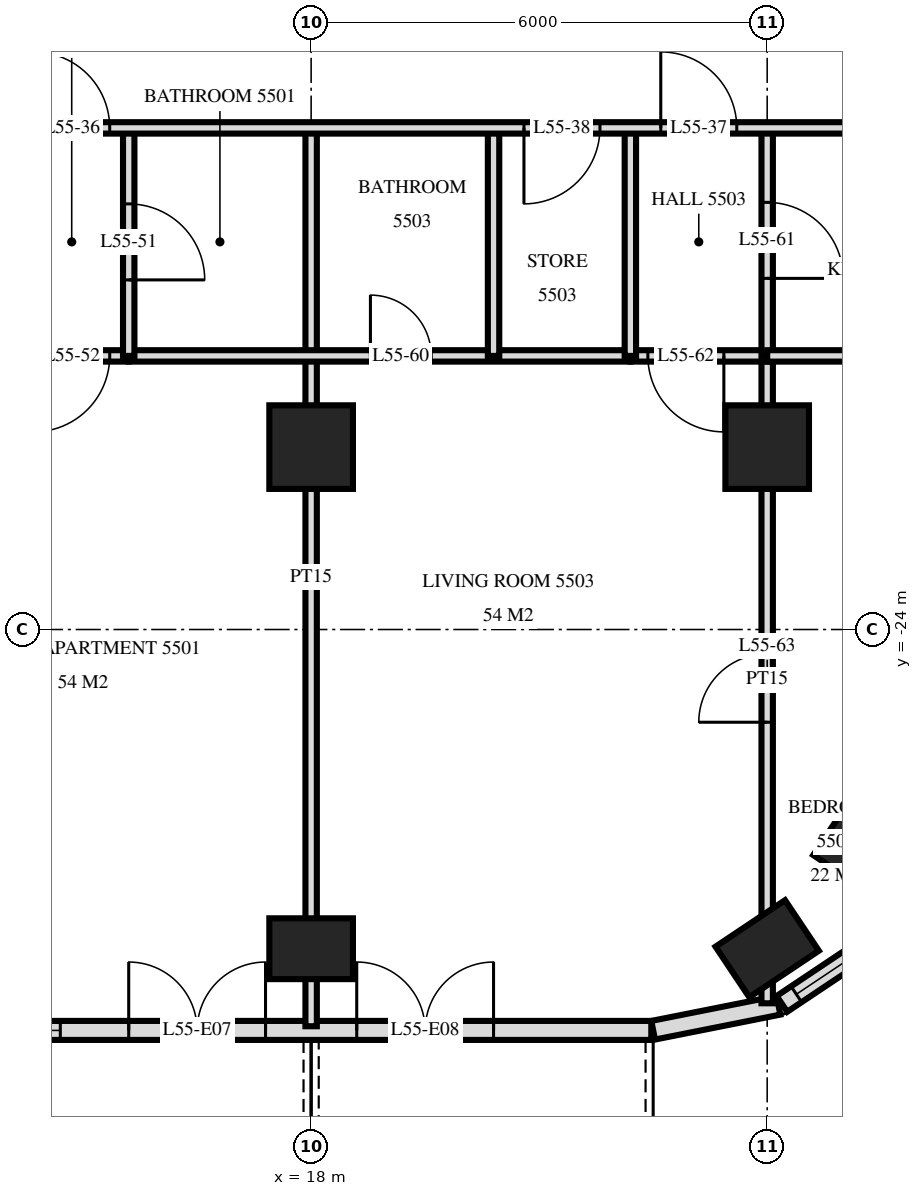
"""IFC4 building model, lengths in metres.
Left out: names, types, materials, properties, quantities, classifications, styles, units other than length and angle.
Written with IfcOpenShell. Run it as: python <this file> out.ifc"""

import sys

from ifc_helpers import new_model, si_unit, direction, frame, frame_2d, origin, origin_2d, place, context, subcontext, project, spatial, rectangle, extrude, element, fill, save


model = new_model("IFC4")
c1 = context("Model", 3, precision=1e-05, world=origin(), true_north=direction((0.0, 1.0)))
c2 = subcontext(c1, "Body", "Model", "MODEL_VIEW")
j1 = project(units=[si_unit("LENGTHUNIT", "METRE"), si_unit("PLANEANGLEUNIT", "RADIAN")], contexts=[c1])
p1 = place(None, origin())
s1 = spatial("IfcSite", under=j1, at=p1, CompositionType="ELEMENT")
p2 = place(p1, origin())
s2 = spatial("IfcBuilding", under=s1, at=p2, CompositionType="ELEMENT")
p3 = place(p2, frame((0.0, 0.0, 211.6)))
s3 = spatial("IfcBuildingStorey", under=s2, at=p3, CompositionType="ELEMENT", Elevation=211.6)
p4 = place(p3, frame((18.0, -28.2, 0.0), z_axis=(0.0, 0.0, 1.0), x_axis=(1.0, 0.0, 0.0)))
e1 = element("IfcColumn", 1, at=p4, inside=s3, PredefinedType="COLUMN", context=c2, shape_type="SweptSolid", body=[
    extrude(rectangle(XDim=1.1, YDim=0.8, at=origin_2d()), origin(), (0.0, 0.0, 1.0), 3.5),
])
p5 = place(p3, frame((18.0, -21.6, 0.0), z_axis=(0.0, 0.0, 1.0), x_axis=(1.0, 0.0, 0.0)))
e2 = element("IfcColumn", 2, at=p5, inside=s3, PredefinedType="COLUMN", context=c2, shape_type="SweptSolid", body=[
    extrude(rectangle(XDim=1.1, YDim=1.1, at=origin_2d()), origin(), (0.0, 0.0, 1.0), 3.5),
])
p6 = place(p3, frame((24.0, -28.2, 0.0), z_axis=(0.0, 0.0, 1.0), x_axis=(0.831459915646, 0.555584744817, 0.0)))
e3 = element("IfcColumn", 3, at=p6, inside=s3, PredefinedType="COLUMN", context=c2, shape_type="SweptSolid", body=[
    extrude(rectangle(XDim=1.1, YDim=0.8, at=origin_2d()), origin(), (0.0, 0.0, 1.0), 3.5),
])
p7 = place(p3, frame((24.0, -21.6, 0.0), z_axis=(0.0, 0.0, 1.0), x_axis=(1.0, 0.0, 0.0)))
e4 = element("IfcColumn", 4, at=p7, inside=s3, PredefinedType="COLUMN", context=c2, shape_type="SweptSolid", body=[
    extrude(rectangle(XDim=1.1, YDim=1.1, at=origin_2d()), origin(), (0.0, 0.0, 1.0), 3.5),
])
p8 = place(p3, frame((25.244, -26.733, 0.0), z_axis=(0.0, 0.0, 1.0), x_axis=(0.555584744817, 0.831459915646, 0.0)))
e5 = element("IfcColumn", 5, at=p8, inside=s3, PredefinedType="COLUMN", context=c2, shape_type="SweptSolid", body=[
    extrude(rectangle(XDim=1.1, YDim=0.8, at=origin_2d()), origin(), (0.0, 0.0, 1.0), 3.5),
])
p9 = place(p3, frame((-22.475, -29.275, 0.0), z_axis=(0.0, 0.0, 1.0), x_axis=(1.0, 0.0, 0.0)))
e6 = element("IfcWall", 6, at=p9, inside=s3, PredefinedType="SOLIDWALL", context=c2, shape_type="SweptSolid", body=[
    extrude(rectangle(XDim=44.951, YDim=0.25, at=frame_2d((22.475, 0.0))), origin(), (0.0, 0.0, 1.0), 3.22),
])
p10 = place(p9, frame((0.575, 0.0, 0.0)))
e7 = element("IfcOpeningElement", 7, at=p10, cuts=e6, PredefinedType="OPENING", context=c2, shape_type="SweptSolid", body=[
    extrude(rectangle(XDim=1.8, YDim=2.4, at=frame_2d((0.9, 1.2))), frame((0.0, 0.135, 0.0), z_axis=(0.0, -1.0, 0.0), x_axis=(1.0, 0.0, 0.0)), (0.0, 0.0, 1.0), 0.27),
])
p11 = place(p9, frame((6.2, 0.0, 0.0)))
e8 = element("IfcOpeningElement", 8, at=p11, cuts=e6, PredefinedType="OPENING", context=c2, shape_type="SweptSolid", body=[
    extrude(rectangle(XDim=1.8, YDim=2.4, at=frame_2d((0.9, 1.2))), frame((0.0, 0.135, 0.0), z_axis=(0.0, -1.0, 0.0), x_axis=(1.0, 0.0, 0.0)), (0.0, 0.0, 1.0), 0.27),
])
p12 = place(p9, frame((8.45, 0.0, 0.9)))
e9 = element("IfcOpeningElement", 9, at=p12, cuts=e6, PredefinedType="OPENING", context=c2, shape_type="SweptSolid", body=[
    extrude(rectangle(XDim=1.8, YDim=1.5, at=frame_2d((0.9, 0.75))), frame((0.0, 0.135, 0.0), z_axis=(0.0, -1.0, 0.0), x_axis=(1.0, 0.0, 0.0)), (0.0, 0.0, 1.0), 0.27),
])
p13 = place(p9, frame((11.075, 0.0, 0.0)))
e10 = element("IfcOpeningElement", 10, at=p13, cuts=e6, PredefinedType="OPENING", context=c2, shape_type="SweptSolid", body=[
    extrude(rectangle(XDim=1.8, YDim=2.4, at=frame_2d((0.9, 1.2))), frame((0.0, 0.135, 0.0), z_axis=(0.0, -1.0, 0.0), x_axis=(1.0, 0.0, 0.0)), (0.0, 0.0, 1.0), 0.27),
])
p14 = place(p9, frame((13.775, 0.0, 0.9)))
e11 = element("IfcOpeningElement", 11, at=p14, cuts=e6, PredefinedType="OPENING", context=c2, shape_type="SweptSolid", body=[
    extrude(rectangle(XDim=2.4, YDim=1.5, at=frame_2d((1.2, 0.75))), frame((0.0, 0.135, 0.0), z_axis=(0.0, -1.0, 0.0), x_axis=(1.0, 0.0, 0.0)), (0.0, 0.0, 1.0), 0.27),
])
p15 = place(p9, frame((16.775, 0.0, 0.9)))
e12 = element("IfcOpeningElement", 12, at=p15, cuts=e6, PredefinedType="OPENING", context=c2, shape_type="SweptSolid", body=[
    extrude(rectangle(XDim=2.4, YDim=1.5, at=frame_2d((1.2, 0.75))), frame((0.0, 0.135, 0.0), z_axis=(0.0, -1.0, 0.0), x_axis=(1.0, 0.0, 0.0)), (0.0, 0.0, 1.0), 0.27),
])
p16 = place(p9, frame((20.075, 0.0, 0.0)))
e13 = element("IfcOpeningElement", 13, at=p16, cuts=e6, PredefinedType="OPENING", context=c2, shape_type="SweptSolid", body=[
    extrude(rectangle(XDim=1.8, YDim=2.4, at=frame_2d((0.9, 1.2))), frame((0.0, 0.135, 0.0), z_axis=(0.0, -1.0, 0.0), x_axis=(1.0, 0.0, 0.0)), (0.0, 0.0, 1.0), 0.27),
])
p17 = place(p9, frame((23.075, 0.0, 0.0)))
e14 = element("IfcOpeningElement", 14, at=p17, cuts=e6, PredefinedType="OPENING", context=c2, shape_type="SweptSolid", body=[
    extrude(rectangle(XDim=1.8, YDim=2.4, at=frame_2d((0.9, 1.2))), frame((0.0, 0.135, 0.0), z_axis=(0.0, -1.0, 0.0), x_axis=(1.0, 0.0, 0.0)), (0.0, 0.0, 1.0), 0.27),
])
p18 = place(p9, frame((25.775, 0.0, 0.9)))
e15 = element("IfcOpeningElement", 15, at=p18, cuts=e6, PredefinedType="OPENING", context=c2, shape_type="SweptSolid", body=[
    extrude(rectangle(XDim=2.4, YDim=1.5, at=frame_2d((1.2, 0.75))), frame((0.0, 0.135, 0.0), z_axis=(0.0, -1.0, 0.0), x_axis=(1.0, 0.0, 0.0)), (0.0, 0.0, 1.0), 0.27),
])
p19 = place(p9, frame((29.075, 0.0, 0.0)))
e16 = element("IfcOpeningElement", 16, at=p19, cuts=e6, PredefinedType="OPENING", context=c2, shape_type="SweptSolid", body=[
    extrude(rectangle(XDim=1.8, YDim=2.4, at=frame_2d((0.9, 1.2))), frame((0.0, 0.135, 0.0), z_axis=(0.0, -1.0, 0.0), x_axis=(1.0, 0.0, 0.0)), (0.0, 0.0, 1.0), 0.27),
])
p20 = place(p9, frame((31.775, 0.0, 0.9)))
e17 = element("IfcOpeningElement", 17, at=p20, cuts=e6, PredefinedType="OPENING", context=c2, shape_type="SweptSolid", body=[
    extrude(rectangle(XDim=2.4, YDim=1.5, at=frame_2d((1.2, 0.75))), frame((0.0, 0.135, 0.0), z_axis=(0.0, -1.0, 0.0), x_axis=(1.0, 0.0, 0.0)), (0.0, 0.0, 1.0), 0.27),
])
p21 = place(p9, frame((34.775, 0.0, 0.9)))
e18 = element("IfcOpeningElement", 18, at=p21, cuts=e6, PredefinedType="OPENING", context=c2, shape_type="SweptSolid", body=[
    extrude(rectangle(XDim=2.4, YDim=1.5, at=frame_2d((1.2, 0.75))), frame((0.0, 0.135, 0.0), z_axis=(0.0, -1.0, 0.0), x_axis=(1.0, 0.0, 0.0)), (0.0, 0.0, 1.0), 0.27),
])
p22 = place(p9, frame((38.075, 0.0, 0.0)))
e19 = element("IfcOpeningElement", 19, at=p22, cuts=e6, PredefinedType="OPENING", context=c2, shape_type="SweptSolid", body=[
    extrude(rectangle(XDim=1.8, YDim=2.4, at=frame_2d((0.9, 1.2))), frame((0.0, 0.135, 0.0), z_axis=(0.0, -1.0, 0.0), x_axis=(1.0, 0.0, 0.0)), (0.0, 0.0, 1.0), 0.27),
])
p23 = place(p9, frame((41.075, 0.0, 0.0)))
e20 = element("IfcOpeningElement", 20, at=p23, cuts=e6, PredefinedType="OPENING", context=c2, shape_type="SweptSolid", body=[
    extrude(rectangle(XDim=1.8, YDim=2.4, at=frame_2d((0.9, 1.2))), frame((0.0, 0.135, 0.0), z_axis=(0.0, -1.0, 0.0), x_axis=(1.0, 0.0, 0.0)), (0.0, 0.0, 1.0), 0.27),
])
p24 = place(p3, frame((22.5, -29.273, 0.0), z_axis=(0.0, 0.0, 1.0), x_axis=(0.980775640221, 0.19513878023, 0.0)))
e21 = element("IfcWall", 21, at=p24, inside=s3, PredefinedType="SOLIDWALL", context=c2, shape_type="SweptSolid", body=[
    extrude(rectangle(XDim=1.681, YDim=0.25, at=frame_2d((0.841, 0.0))), origin(), (0.0, 0.0, 1.0), 3.22),
])
p25 = place(p3, frame((24.194, -28.926, 0.0), z_axis=(0.0, 0.0, 1.0), x_axis=(0.831482937015, 0.55555029066, 0.0)))
e22 = element("IfcWall", 22, at=p25, inside=s3, PredefinedType="SOLIDWALL", context=c2, shape_type="SweptSolid", body=[
    extrude(rectangle(XDim=1.656, YDim=0.25, at=frame_2d((0.828, 0.0))), origin(), (0.0, 0.0, 1.0), 3.22),
])
p26 = place(p25, frame((0.228, 0.0, 0.9)))
e23 = element("IfcOpeningElement", 23, at=p26, cuts=e22, PredefinedType="OPENING", context=c2, shape_type="SweptSolid", body=[
    extrude(rectangle(XDim=1.2, YDim=1.5, at=frame_2d((0.6, 0.75))), frame((0.0, 0.135, 0.0), z_axis=(0.0, -1.0, 0.0), x_axis=(1.0, 0.0, 0.0)), (0.0, 0.0, 1.0), 0.27),
])
p27 = place(p3, frame((24.0, -20.4, 0.0), z_axis=(0.0, 0.0, 1.0), x_axis=(0.0, 1.0, 0.0)))
e24 = element("IfcWall", 24, at=p27, inside=s3, PredefinedType="PARTITIONING", context=c2, shape_type="SweptSolid", body=[
    extrude(rectangle(XDim=3.0, YDim=0.15, at=frame_2d((1.5, 0.0))), origin(), (0.0, 0.0, 1.0), 3.22),
])
p28 = place(p27, frame((1.02, 0.0, 0.0)))
e25 = element("IfcOpeningElement", 25, at=p28, cuts=e24, PredefinedType="OPENING", context=c2, shape_type="SweptSolid", body=[
    extrude(rectangle(XDim=1.0, YDim=2.1, at=frame_2d((0.5, 1.05))), frame((0.0, 0.085, 0.0), z_axis=(0.0, -1.0, 0.0), x_axis=(1.0, 0.0, 0.0)), (0.0, 0.0, 1.0), 0.17),
])
p29 = place(p3, frame((24.0, -28.918, 0.0), z_axis=(0.0, 0.0, 1.0), x_axis=(0.0, 1.0, 0.0)))
e26 = element("IfcWall", 26, at=p29, inside=s3, PredefinedType="PARTITIONING", context=c2, shape_type="SweptSolid", body=[
    extrude(rectangle(XDim=8.518, YDim=0.15, at=frame_2d((4.259, 0.0))), origin(), (0.0, 0.0, 1.0), 3.22),
])
p30 = place(p29, frame((3.698, 0.0, 0.0)))
e27 = element("IfcOpeningElement", 27, at=p30, cuts=e26, PredefinedType="OPENING", context=c2, shape_type="SweptSolid", body=[
    extrude(rectangle(XDim=0.9, YDim=2.1, at=frame_2d((0.45, 1.05))), frame((0.0, 0.085, 0.0), z_axis=(0.0, -1.0, 0.0), x_axis=(1.0, 0.0, 0.0)), (0.0, 0.0, 1.0), 0.17),
])
for number, where, z_axis, x_axis in (
    (28, (22.2, -20.4, 0.0), (0.0, 0.0, 1.0), (0.0, 1.0, 0.0)),
    (29, (20.4, -20.4, 0.0), (0.0, 0.0, 1.0), (0.0, 1.0, 0.0)),
):
    element("IfcWall", number, at=place(p3, frame(where, z_axis=z_axis, x_axis=x_axis)), inside=s3, PredefinedType="PARTITIONING", context=c2, shape_type="SweptSolid", body=[
        extrude(rectangle(XDim=3.0, YDim=0.15, at=frame_2d((1.5, 0.0))), origin(), (0.0, 0.0, 1.0), 3.22),
    ])
p31 = place(p3, frame((18.0, -29.22, 0.0), z_axis=(0.0, 0.0, 1.0), x_axis=(0.0, 1.0, 0.0)))
e30 = element("IfcWall", 30, at=p31, inside=s3, PredefinedType="PARTITIONING", context=c2, shape_type="SweptSolid", body=[
    extrude(rectangle(XDim=11.82, YDim=0.15, at=frame_2d((5.91, 0.0))), origin(), (0.0, 0.0, 1.0), 3.22),
])
p32 = place(p3, frame((15.6, -20.4, 0.0), z_axis=(0.0, 0.0, 1.0), x_axis=(0.0, 1.0, 0.0)))
e31 = element("IfcWall", 31, at=p32, inside=s3, PredefinedType="PARTITIONING", context=c2, shape_type="SweptSolid", body=[
    extrude(rectangle(XDim=3.0, YDim=0.15, at=frame_2d((1.5, 0.0))), origin(), (0.0, 0.0, 1.0), 3.22),
])
p33 = place(p32, frame((1.0, 0.0, 0.0)))
e32 = element("IfcOpeningElement", 32, at=p33, cuts=e31, PredefinedType="OPENING", context=c2, shape_type="SweptSolid", body=[
    extrude(rectangle(XDim=1.0, YDim=2.1, at=frame_2d((0.5, 1.05))), frame((0.0, 0.085, 0.0), z_axis=(0.0, -1.0, 0.0), x_axis=(1.0, 0.0, 0.0)), (0.0, 0.0, 1.0), 0.17),
])
p34 = place(p3, frame((14.1, -20.4, 0.0), z_axis=(0.0, 0.0, 1.0), x_axis=(1.0, 0.0, 0.0)))
e33 = element("IfcWall", 33, at=p34, inside=s3, PredefinedType="PARTITIONING", context=c2, shape_type="SweptSolid", body=[
    extrude(rectangle(XDim=1.5, YDim=0.15, at=frame_2d((0.75, 0.0))), origin(), (0.0, 0.0, 1.0), 3.22),
])
p35 = place(p34, frame((0.25, 0.0, 0.0)))
e34 = element("IfcOpeningElement", 34, at=p35, cuts=e33, PredefinedType="OPENING", context=c2, shape_type="SweptSolid", body=[
    extrude(rectangle(XDim=1.0, YDim=2.1, at=frame_2d((0.5, 1.05))), frame((0.0, 0.085, 0.0), z_axis=(0.0, -1.0, 0.0), x_axis=(1.0, 0.0, 0.0)), (0.0, 0.0, 1.0), 0.17),
])
p36 = place(p3, frame((22.2, -20.4, 0.0), z_axis=(0.0, 0.0, 1.0), x_axis=(1.0, 0.0, 0.0)))
e35 = element("IfcWall", 35, at=p36, inside=s3, PredefinedType="PARTITIONING", context=c2, shape_type="SweptSolid", body=[
    extrude(rectangle(XDim=1.8, YDim=0.15, at=frame_2d((0.9, 0.0))), origin(), (0.0, 0.0, 1.0), 3.22),
])
p37 = place(p36, frame((0.23, 0.0, 0.0)))
e36 = element("IfcOpeningElement", 36, at=p37, cuts=e35, PredefinedType="OPENING", context=c2, shape_type="SweptSolid", body=[
    extrude(rectangle(XDim=1.0, YDim=2.1, at=frame_2d((0.5, 1.05))), frame((0.0, 0.085, 0.0), z_axis=(0.0, -1.0, 0.0), x_axis=(1.0, 0.0, 0.0)), (0.0, 0.0, 1.0), 0.17),
])
p38 = place(p3, frame((15.6, -20.4, 0.0), z_axis=(0.0, 0.0, 1.0), x_axis=(1.0, 0.0, 0.0)))
e37 = element("IfcWall", 37, at=p38, inside=s3, PredefinedType="PARTITIONING", context=c2, shape_type="SweptSolid", body=[
    extrude(rectangle(XDim=6.6, YDim=0.15, at=frame_2d((3.3, 0.0))), origin(), (0.0, 0.0, 1.0), 3.22),
])
p39 = place(p38, frame((3.18, 0.0, 0.0)))
e38 = element("IfcOpeningElement", 38, at=p39, cuts=e37, PredefinedType="OPENING", context=c2, shape_type="SweptSolid", body=[
    extrude(rectangle(XDim=0.8, YDim=2.1, at=frame_2d((0.4, 1.05))), frame((0.0, 0.085, 0.0), z_axis=(0.0, -1.0, 0.0), x_axis=(1.0, 0.0, 0.0)), (0.0, 0.0, 1.0), 0.17),
])
p40 = place(p3, frame((24.0, -20.4, 0.0), z_axis=(0.0, 0.0, 1.0), x_axis=(1.0, 0.0, 0.0)))
e39 = element("IfcWall", 39, at=p40, inside=s3, PredefinedType="PARTITIONING", context=c2, shape_type="SweptSolid", body=[
    extrude(rectangle(XDim=2.82, YDim=0.15, at=frame_2d((1.41, 0.0))), origin(), (0.0, 0.0, 1.0), 3.22),
])
p41 = place(p3, frame((-26.82, -17.4, 0.0), z_axis=(0.0, 0.0, 1.0), x_axis=(1.0, 0.0, 0.0)))
e40 = element("IfcWall", 40, at=p41, inside=s3, PredefinedType="PARTITIONING", context=c2, shape_type="SweptSolid", body=[
    extrude(rectangle(XDim=53.64, YDim=0.15, at=frame_2d((26.82, 0.0))), origin(), (0.0, 0.0, 1.0), 3.22),
])
p42 = place(p41, frame((4.92, 0.0, 0.0)))
e41 = element("IfcOpeningElement", 41, at=p42, cuts=e40, PredefinedType="OPENING", context=c2, shape_type="SweptSolid", body=[
    extrude(rectangle(XDim=1.0, YDim=2.1, at=frame_2d((0.5, 1.05))), frame((0.0, 0.085, 0.0), z_axis=(0.0, -1.0, 0.0), x_axis=(1.0, 0.0, 0.0)), (0.0, 0.0, 1.0), 0.17),
])
p43 = place(p41, frame((1.62, 0.0, 0.0)))
e42 = element("IfcOpeningElement", 42, at=p43, cuts=e40, PredefinedType="OPENING", context=c2, shape_type="SweptSolid", body=[
    extrude(rectangle(XDim=1.0, YDim=2.1, at=frame_2d((0.5, 1.05))), frame((0.0, 0.085, 0.0), z_axis=(0.0, -1.0, 0.0), x_axis=(1.0, 0.0, 0.0)), (0.0, 0.0, 1.0), 0.17),
])
p44 = place(p41, frame((41.17, 0.0, 0.0)))
e43 = element("IfcOpeningElement", 43, at=p44, cuts=e40, PredefinedType="OPENING", context=c2, shape_type="SweptSolid", body=[
    extrude(rectangle(XDim=1.0, YDim=2.1, at=frame_2d((0.5, 1.05))), frame((0.0, 0.085, 0.0), z_axis=(0.0, -1.0, 0.0), x_axis=(1.0, 0.0, 0.0)), (0.0, 0.0, 1.0), 0.17),
])
p45 = place(p41, frame((49.42, 0.0, 0.0)))
e44 = element("IfcOpeningElement", 44, at=p45, cuts=e40, PredefinedType="OPENING", context=c2, shape_type="SweptSolid", body=[
    extrude(rectangle(XDim=1.0, YDim=2.1, at=frame_2d((0.5, 1.05))), frame((0.0, 0.085, 0.0), z_axis=(0.0, -1.0, 0.0), x_axis=(1.0, 0.0, 0.0)), (0.0, 0.0, 1.0), 0.17),
])
p46 = place(p41, frame((47.62, 0.0, 0.0)))
e45 = element("IfcOpeningElement", 45, at=p46, cuts=e40, PredefinedType="OPENING", context=c2, shape_type="SweptSolid", body=[
    extrude(rectangle(XDim=1.0, YDim=2.1, at=frame_2d((0.5, 1.05))), frame((0.0, 0.085, 0.0), z_axis=(0.0, -1.0, 0.0), x_axis=(1.0, 0.0, 0.0)), (0.0, 0.0, 1.0), 0.17),
])
p47 = place(p41, frame((21.82, 0.0, 0.0)))
e46 = element("IfcOpeningElement", 46, at=p47, cuts=e40, PredefinedType="OPENING", context=c2, shape_type="SweptSolid", body=[
    extrude(rectangle(XDim=1.0, YDim=2.1, at=frame_2d((0.5, 1.05))), frame((0.0, 0.085, 0.0), z_axis=(0.0, -1.0, 0.0), x_axis=(1.0, 0.0, 0.0)), (0.0, 0.0, 1.0), 0.17),
])
p48 = place(p41, frame((33.82, 0.0, 0.0)))
e47 = element("IfcOpeningElement", 47, at=p48, cuts=e40, PredefinedType="OPENING", context=c2, shape_type="SweptSolid", body=[
    extrude(rectangle(XDim=1.0, YDim=2.1, at=frame_2d((0.5, 1.05))), frame((0.0, 0.085, 0.0), z_axis=(0.0, -1.0, 0.0), x_axis=(1.0, 0.0, 0.0)), (0.0, 0.0, 1.0), 0.17),
])
p49 = place(p26, origin())
e48 = element("IfcWindow", 48, at=p49, inside=s3, PartitioningType="SINGLE_PANEL", PredefinedType="WINDOW", context=c2, shape_type="SweptSolid", body=[
    extrude(rectangle(XDim=1.2, YDim=1.5, at=frame_2d((0.6, 0.75))), frame((0.0, 0.03, 0.0), z_axis=(0.0, -1.0, 0.0), x_axis=(1.0, 0.0, 0.0)), (0.0, 0.0, 1.0), 0.06),
])
fill(e23, e48)
p50 = place(p21, origin())
e49 = element("IfcWindow", 49, at=p50, inside=s3, PartitioningType="SINGLE_PANEL", PredefinedType="WINDOW", context=c2, shape_type="SweptSolid", body=[
    extrude(rectangle(XDim=2.4, YDim=1.5, at=frame_2d((1.2, 0.75))), frame((0.0, 0.03, 0.0), z_axis=(0.0, -1.0, 0.0), x_axis=(1.0, 0.0, 0.0)), (0.0, 0.0, 1.0), 0.06),
])
fill(e18, e49)
p51 = place(p22, origin())
e50 = element("IfcDoor", 50, at=p51, inside=s3, OperationType="DOUBLE_DOOR_SINGLE_SWING", PredefinedType="DOOR", context=c2, shape_type="SweptSolid", body=[
    extrude(rectangle(XDim=1.8, YDim=2.4, at=frame_2d((0.9, 1.2))), frame((0.0, 0.025, 0.0), z_axis=(0.0, -1.0, 0.0), x_axis=(1.0, 0.0, 0.0)), (0.0, 0.0, 1.0), 0.05),
])
fill(e19, e50)
p52 = place(p23, origin())
e51 = element("IfcDoor", 51, at=p52, inside=s3, OperationType="DOUBLE_DOOR_SINGLE_SWING", PredefinedType="DOOR", context=c2, shape_type="SweptSolid", body=[
    extrude(rectangle(XDim=1.8, YDim=2.4, at=frame_2d((0.9, 1.2))), frame((0.0, 0.025, 0.0), z_axis=(0.0, -1.0, 0.0), x_axis=(1.0, 0.0, 0.0)), (0.0, 0.0, 1.0), 0.05),
])
fill(e20, e51)
p53 = place(p44, origin())
e52 = element("IfcDoor", 52, at=p53, inside=s3, OperationType="SINGLE_SWING_RIGHT", PredefinedType="DOOR", context=c2, shape_type="SweptSolid", body=[
    extrude(rectangle(XDim=1.0, YDim=2.1, at=frame_2d((0.5, 1.05))), frame((0.0, 0.025, 0.0), z_axis=(0.0, -1.0, 0.0), x_axis=(1.0, 0.0, 0.0)), (0.0, 0.0, 1.0), 0.05),
])
fill(e43, e52)
p54 = place(p45, origin())
e53 = element("IfcDoor", 53, at=p54, inside=s3, OperationType="SINGLE_SWING_RIGHT", PredefinedType="DOOR", context=c2, shape_type="SweptSolid", body=[
    extrude(rectangle(XDim=1.0, YDim=2.1, at=frame_2d((0.5, 1.05))), frame((0.0, 0.025, 0.0), z_axis=(0.0, -1.0, 0.0), x_axis=(1.0, 0.0, 0.0)), (0.0, 0.0, 1.0), 0.05),
])
fill(e44, e53)
p55 = place(p46, frame((0.5, 0.0, 0.0), z_axis=(0.0, 0.0, 1.0), x_axis=(-1.0, 0.0, 0.0)))
e54 = element("IfcDoor", 54, at=p55, inside=s3, OperationType="SINGLE_SWING_LEFT", PredefinedType="DOOR", context=c2, shape_type="SweptSolid", body=[
    extrude(rectangle(XDim=1.0, YDim=2.1, at=frame_2d((0.0, 1.05))), frame((0.0, -0.025, 0.0), z_axis=(0.0, 1.0, 0.0), x_axis=(-1.0, 0.0, 0.0)), (0.0, 0.0, 1.0), 0.05),
])
fill(e45, e54)
p56 = place(p33, frame((0.5, 0.0, 0.0), z_axis=(0.0, 0.0, 1.0), x_axis=(-1.0, 0.0, 0.0)))
e55 = element("IfcDoor", 55, at=p56, inside=s3, OperationType="SINGLE_SWING_LEFT", PredefinedType="DOOR", context=c2, shape_type="SweptSolid", body=[
    extrude(rectangle(XDim=1.0, YDim=2.1, at=frame_2d((0.0, 1.05))), frame((0.0, -0.025, 0.0), z_axis=(0.0, 1.0, 0.0), x_axis=(-1.0, 0.0, 0.0)), (0.0, 0.0, 1.0), 0.05),
])
fill(e32, e55)
p57 = place(p35, frame((0.5, 0.0, 0.0), z_axis=(0.0, 0.0, 1.0), x_axis=(-1.0, 0.0, 0.0)))
e56 = element("IfcDoor", 56, at=p57, inside=s3, OperationType="SINGLE_SWING_LEFT", PredefinedType="DOOR", context=c2, shape_type="SweptSolid", body=[
    extrude(rectangle(XDim=1.0, YDim=2.1, at=frame_2d((0.0, 1.05))), frame((0.0, -0.025, 0.0), z_axis=(0.0, 1.0, 0.0), x_axis=(-1.0, 0.0, 0.0)), (0.0, 0.0, 1.0), 0.05),
])
fill(e34, e56)
p58 = place(p39, origin())
e57 = element("IfcDoor", 57, at=p58, inside=s3, OperationType="SINGLE_SWING_RIGHT", PredefinedType="DOOR", context=c2, shape_type="SweptSolid", body=[
    extrude(rectangle(XDim=0.8, YDim=2.1, at=frame_2d((0.4, 1.05))), frame((0.0, 0.025, 0.0), z_axis=(0.0, -1.0, 0.0), x_axis=(1.0, 0.0, 0.0)), (0.0, 0.0, 1.0), 0.05),
])
fill(e38, e57)
p59 = place(p28, frame((0.5, 0.0, 0.0), z_axis=(0.0, 0.0, 1.0), x_axis=(-1.0, 0.0, 0.0)))
e58 = element("IfcDoor", 58, at=p59, inside=s3, OperationType="SINGLE_SWING_LEFT", PredefinedType="DOOR", context=c2, shape_type="SweptSolid", body=[
    extrude(rectangle(XDim=1.0, YDim=2.1, at=frame_2d((0.0, 1.05))), frame((0.0, -0.025, 0.0), z_axis=(0.0, 1.0, 0.0), x_axis=(-1.0, 0.0, 0.0)), (0.0, 0.0, 1.0), 0.05),
])
fill(e25, e58)
p60 = place(p37, frame((0.5, 0.0, 0.0), z_axis=(0.0, 0.0, 1.0), x_axis=(-1.0, 0.0, 0.0)))
e59 = element("IfcDoor", 59, at=p60, inside=s3, OperationType="SINGLE_SWING_RIGHT", PredefinedType="DOOR", context=c2, shape_type="SweptSolid", body=[
    extrude(rectangle(XDim=1.0, YDim=2.1, at=frame_2d((0.0, 1.05))), frame((0.0, -0.025, 0.0), z_axis=(0.0, 1.0, 0.0), x_axis=(-1.0, 0.0, 0.0)), (0.0, 0.0, 1.0), 0.05),
])
fill(e36, e59)
p61 = place(p30, origin())
e60 = element("IfcDoor", 60, at=p61, inside=s3, OperationType="SINGLE_SWING_RIGHT", PredefinedType="DOOR", context=c2, shape_type="SweptSolid", body=[
    extrude(rectangle(XDim=0.9, YDim=2.1, at=frame_2d((0.45, 1.05))), frame((0.0, 0.025, 0.0), z_axis=(0.0, -1.0, 0.0), x_axis=(1.0, 0.0, 0.0)), (0.0, 0.0, 1.0), 0.05),
])
fill(e27, e60)
save(model, sys.argv[1])
